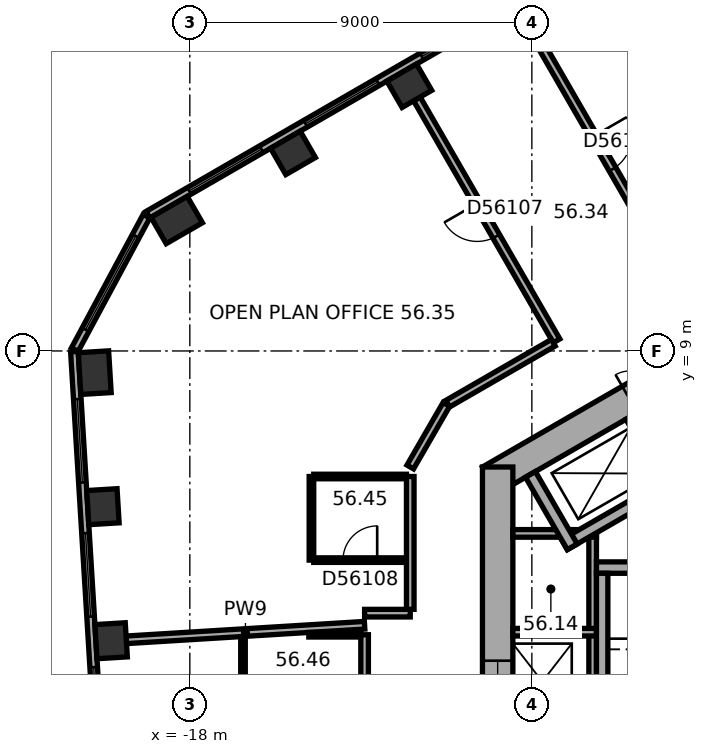
"""IFC4 building model, lengths in metres.
Left out: names, types, materials, properties, quantities, classifications, styles, units other than length and angle.
Written with IfcOpenShell. Run it as: python <this file> out.ifc"""

import sys

from ifc_helpers import new_model, si_unit, direction, frame, frame_2d, origin, origin_2d, place, context, subcontext, project, spatial, rectangle, extrude, element, fill, save


model = new_model("IFC4")
c1 = context("Model", 3, precision=1e-05, world=origin(), true_north=direction((0.0, 1.0)))
c2 = subcontext(c1, "Body", "Model", "MODEL_VIEW")
j1 = project(units=[si_unit("LENGTHUNIT", "METRE"), si_unit("PLANEANGLEUNIT", "RADIAN")], contexts=[c1])
p1 = place(None, origin())
s1 = spatial("IfcSite", under=j1, at=p1, CompositionType="ELEMENT")
p2 = place(p1, origin())
s2 = spatial("IfcBuilding", under=s1, at=p2, CompositionType="ELEMENT")
p3 = place(p2, frame((0.0, 0.0, 229.1)))
s3 = spatial("IfcBuildingStorey", under=s2, at=p3, CompositionType="ELEMENT", Elevation=229.1)
for number, where, z_axis, x_axis in (
    (1, (-12.225, 15.978, 0.0), (0.0, 0.0, 1.0), (-0.866, -0.5, 0.0)),
    (2, (-15.285, 14.211, 0.0), (0.0, 0.0, 1.0), (-0.866, -0.5, 0.0)),
):
    element("IfcColumn", number, at=place(p3, frame(where, z_axis=z_axis, x_axis=x_axis)), inside=s3, PredefinedType="COLUMN", context=c2, shape_type="SweptSolid", body=[
        extrude(rectangle(XDim=0.9, YDim=0.8, at=origin_2d()), origin(), (0.0, 0.0, 1.0), 3.7),
    ])
for number, where, z_axis, x_axis in (
    (3, (-18.345, 12.445, 0.0), (0.0, 0.0, 1.0), (-0.866, -0.5, 0.0)),
    (4, (-20.503, 8.429, 0.0), (0.0, 0.0, 1.0), (0.061, -0.998, 0.0)),
):
    element("IfcColumn", number, at=place(p3, frame(where, z_axis=z_axis, x_axis=x_axis)), inside=s3, PredefinedType="COLUMN", context=c2, shape_type="SweptSolid", body=[
        extrude(rectangle(XDim=1.1, YDim=0.8, at=origin_2d()), origin(), (0.0, 0.0, 1.0), 3.7),
    ])
for number, where, z_axis, x_axis in (
    (5, (-20.287, 4.902, 0.0), (0.0, 0.0, 1.0), (0.061, -0.998, 0.0)),
    (6, (-20.071, 1.375, 0.0), (0.0, 0.0, 1.0), (0.061, -0.998, 0.0)),
):
    element("IfcColumn", number, at=place(p3, frame(where, z_axis=z_axis, x_axis=x_axis)), inside=s3, PredefinedType="COLUMN", context=c2, shape_type="SweptSolid", body=[
        extrude(rectangle(XDim=0.9, YDim=0.8, at=origin_2d()), origin(), (0.0, 0.0, 1.0), 3.7),
    ])
p4 = place(p3, frame((0.2, 11.547, 0.0), z_axis=(0.0, 0.0, 1.0), x_axis=(-0.866023897231, -0.500002609418, 0.0)))
e7 = element("IfcWall", 7, at=p4, inside=s3, PredefinedType="SHEAR", context=c2, shape_type="SweptSolid", body=[
    extrude(rectangle(XDim=11.894, YDim=0.8, at=frame_2d((5.947, 0.0))), origin(), (0.0, 0.0, 1.0), 3.7),
])
p5 = place(p4, frame((6.147, 0.0, 0.0)))
e8 = element("IfcOpeningElement", 8, at=p5, cuts=e7, PredefinedType="OPENING", context=c2, shape_type="SweptSolid", body=[
    extrude(rectangle(XDim=1.5, YDim=2.1, at=frame_2d((0.75, 1.05))), frame((0.0, 0.41, 0.0), z_axis=(0.0, -1.0, 0.0), x_axis=(1.0, 0.0, 0.0)), (0.0, 0.0, 1.0), 0.82),
])
p6 = place(p4, frame((2.997, 0.0, 0.0)))
e9 = element("IfcOpeningElement", 9, at=p6, cuts=e7, PredefinedType="OPENING", context=c2, shape_type="SweptSolid", body=[
    extrude(rectangle(XDim=0.9, YDim=2.1, at=frame_2d((0.45, 1.05))), frame((0.0, 0.41, 0.0), z_axis=(0.0, -1.0, 0.0), x_axis=(1.0, 0.0, 0.0)), (0.0, 0.0, 1.0), 0.82),
])
p7 = place(p3, frame((-9.9, 5.947, 0.0), z_axis=(0.0, 0.0, 1.0), x_axis=(0.0, -1.0, 0.0)))
e10 = element("IfcWall", 10, at=p7, inside=s3, PredefinedType="SHEAR", context=c2, shape_type="SweptSolid", body=[
    extrude(rectangle(XDim=11.894, YDim=0.8, at=frame_2d((5.947, 0.0))), origin(), (0.0, 0.0, 1.0), 3.7),
])
p8 = place(p7, frame((5.097, 0.0, 0.0)))
e11 = element("IfcOpeningElement", 11, at=p8, cuts=e10, PredefinedType="OPENING", context=c2, shape_type="SweptSolid", body=[
    extrude(rectangle(XDim=1.1, YDim=2.1, at=frame_2d((0.55, 1.05))), frame((0.0, 0.41, 0.0), z_axis=(0.0, -1.0, 0.0), x_axis=(1.0, 0.0, 0.0)), (0.0, 0.0, 1.0), 0.82),
])
p9 = place(p7, frame((7.697, 0.0, 0.0)))
e12 = element("IfcOpeningElement", 12, at=p9, cuts=e10, PredefinedType="OPENING", context=c2, shape_type="SweptSolid", body=[
    extrude(rectangle(XDim=1.1, YDim=2.1, at=frame_2d((0.55, 1.05))), frame((0.0, 0.41, 0.0), z_axis=(0.0, -1.0, 0.0), x_axis=(1.0, 0.0, 0.0)), (0.0, 0.0, 1.0), 0.82),
])
p10 = place(p3, frame((-2.786, 22.005, 0.0), z_axis=(0.0, 0.0, 1.0), x_axis=(-0.866026555358, -0.49999800541, 0.0)))
e13 = element("IfcWall", 13, at=p10, inside=s3, PredefinedType="STANDARD", context=c2, shape_type="SweptSolid", body=[
    extrude(rectangle(XDim=18.841, YDim=0.2, at=frame_2d((9.421, 0.0))), origin(), (0.0, 0.0, 1.0), 3.7),
])
p11 = place(p10, frame((1.254, 0.0, 0.9)))
e14 = element("IfcOpeningElement", 14, at=p11, cuts=e13, PredefinedType="OPENING", context=c2, shape_type="SweptSolid", body=[
    extrude(rectangle(XDim=2.2, YDim=2.0, at=frame_2d((1.1, 1.0))), frame((0.0, 0.11, 0.0), z_axis=(0.0, -1.0, 0.0), x_axis=(1.0, 0.0, 0.0)), (0.0, 0.0, 1.0), 0.22),
])
p12 = place(p10, frame((4.788, 0.0, 0.9)))
e15 = element("IfcOpeningElement", 15, at=p12, cuts=e13, PredefinedType="OPENING", context=c2, shape_type="SweptSolid", body=[
    extrude(rectangle(XDim=2.2, YDim=2.0, at=frame_2d((1.1, 1.0))), frame((0.0, 0.11, 0.0), z_axis=(0.0, -1.0, 0.0), x_axis=(1.0, 0.0, 0.0)), (0.0, 0.0, 1.0), 0.22),
])
p13 = place(p10, frame((8.321, 0.0, 0.9)))
e16 = element("IfcOpeningElement", 16, at=p13, cuts=e13, PredefinedType="OPENING", context=c2, shape_type="SweptSolid", body=[
    extrude(rectangle(XDim=2.2, YDim=2.0, at=frame_2d((1.1, 1.0))), frame((0.0, 0.11, 0.0), z_axis=(0.0, -1.0, 0.0), x_axis=(1.0, 0.0, 0.0)), (0.0, 0.0, 1.0), 0.22),
])
p14 = place(p10, frame((11.855, 0.0, 0.9)))
e17 = element("IfcOpeningElement", 17, at=p14, cuts=e13, PredefinedType="OPENING", context=c2, shape_type="SweptSolid", body=[
    extrude(rectangle(XDim=2.2, YDim=2.0, at=frame_2d((1.1, 1.0))), frame((0.0, 0.11, 0.0), z_axis=(0.0, -1.0, 0.0), x_axis=(1.0, 0.0, 0.0)), (0.0, 0.0, 1.0), 0.22),
])
p15 = place(p10, frame((15.389, 0.0, 0.9)))
e18 = element("IfcOpeningElement", 18, at=p15, cuts=e13, PredefinedType="OPENING", context=c2, shape_type="SweptSolid", body=[
    extrude(rectangle(XDim=2.2, YDim=2.0, at=frame_2d((1.1, 1.0))), frame((0.0, 0.11, 0.0), z_axis=(0.0, -1.0, 0.0), x_axis=(1.0, 0.0, 0.0)), (0.0, 0.0, 1.0), 0.22),
])
p16 = place(p3, frame((-19.141, 12.545, 0.0), z_axis=(0.0, 0.0, 1.0), x_axis=(-0.473306370921, -0.880897882416, 0.0)))
e19 = element("IfcWall", 19, at=p16, inside=s3, PredefinedType="STANDARD", context=c2, shape_type="SweptSolid", body=[
    extrude(rectangle(XDim=3.983, YDim=0.2, at=frame_2d((1.991, 0.0))), origin(), (0.0, 0.0, 1.0), 3.7),
])
p17 = place(p16, frame((0.591, 0.0, 0.9)))
e20 = element("IfcOpeningElement", 20, at=p17, cuts=e19, PredefinedType="OPENING", context=c2, shape_type="SweptSolid", body=[
    extrude(rectangle(XDim=2.8, YDim=2.0, at=frame_2d((1.4, 1.0))), frame((0.0, 0.11, 0.0), z_axis=(0.0, -1.0, 0.0), x_axis=(1.0, 0.0, 0.0)), (0.0, 0.0, 1.0), 0.22),
])
p18 = place(p3, frame((-21.038, 8.984, 0.0), z_axis=(0.0, 0.0, 1.0), x_axis=(0.061043935634, -0.998135079998, 0.0)))
e21 = element("IfcWall", 21, at=p18, inside=s3, PredefinedType="STANDARD", context=c2, shape_type="SweptSolid", body=[
    extrude(rectangle(XDim=18.841, YDim=0.2, at=frame_2d((9.421, 0.0))), origin(), (0.0, 0.0, 1.0), 3.7),
])
p19 = place(p18, frame((1.253, 0.0, 0.9)))
e22 = element("IfcOpeningElement", 22, at=p19, cuts=e21, PredefinedType="OPENING", context=c2, shape_type="SweptSolid", body=[
    extrude(rectangle(XDim=2.2, YDim=2.0, at=frame_2d((1.1, 1.0))), frame((0.0, 0.11, 0.0), z_axis=(0.0, -1.0, 0.0), x_axis=(1.0, 0.0, 0.0)), (0.0, 0.0, 1.0), 0.22),
])
p20 = place(p18, frame((4.786, 0.0, 0.9)))
e23 = element("IfcOpeningElement", 23, at=p20, cuts=e21, PredefinedType="OPENING", context=c2, shape_type="SweptSolid", body=[
    extrude(rectangle(XDim=2.2, YDim=2.0, at=frame_2d((1.1, 1.0))), frame((0.0, 0.11, 0.0), z_axis=(0.0, -1.0, 0.0), x_axis=(1.0, 0.0, 0.0)), (0.0, 0.0, 1.0), 0.22),
])
p21 = place(p18, frame((8.32, 0.0, 0.9)))
e24 = element("IfcOpeningElement", 24, at=p21, cuts=e21, PredefinedType="OPENING", context=c2, shape_type="SweptSolid", body=[
    extrude(rectangle(XDim=2.2, YDim=2.0, at=frame_2d((1.1, 1.0))), frame((0.0, 0.11, 0.0), z_axis=(0.0, -1.0, 0.0), x_axis=(1.0, 0.0, 0.0)), (0.0, 0.0, 1.0), 0.22),
])
p22 = place(p18, frame((11.854, 0.0, 0.9)))
e25 = element("IfcOpeningElement", 25, at=p22, cuts=e21, PredefinedType="OPENING", context=c2, shape_type="SweptSolid", body=[
    extrude(rectangle(XDim=2.2, YDim=2.0, at=frame_2d((1.1, 1.0))), frame((0.0, 0.11, 0.0), z_axis=(0.0, -1.0, 0.0), x_axis=(1.0, 0.0, 0.0)), (0.0, 0.0, 1.0), 0.22),
])
p23 = place(p18, frame((15.387, 0.0, 0.9)))
e26 = element("IfcOpeningElement", 26, at=p23, cuts=e21, PredefinedType="OPENING", context=c2, shape_type="SweptSolid", body=[
    extrude(rectangle(XDim=2.2, YDim=2.0, at=frame_2d((1.1, 1.0))), frame((0.0, 0.11, 0.0), z_axis=(0.0, -1.0, 0.0), x_axis=(1.0, 0.0, 0.0)), (0.0, 0.0, 1.0), 0.22),
])
p24 = place(p3, frame((-7.4, 4.3, 0.0), z_axis=(0.0, 0.0, 1.0), x_axis=(0.0, -1.0, 0.0)))
e27 = element("IfcWall", 27, at=p24, inside=s3, PredefinedType="PARTITIONING", context=c2, shape_type="SweptSolid", body=[
    extrude(rectangle(XDim=8.0, YDim=0.2, at=frame_2d((4.0, 0.0))), origin(), (0.0, 0.0, 1.0), 3.42),
])
for number, where, z_axis, x_axis in (
    (28, (-7.3, 4.2, 0.0), (0.0, 0.0, 1.0), (-1.0, 0.0, 0.0)),
    (29, (-7.3, 1.6, 0.0), (0.0, 0.0, 1.0), (-1.0, 0.0, 0.0)),
):
    element("IfcWall", number, at=place(p3, frame(where, z_axis=z_axis, x_axis=x_axis)), inside=s3, PredefinedType="PARTITIONING", context=c2, shape_type="SweptSolid", body=[
        extrude(rectangle(XDim=2.2, YDim=0.2, at=frame_2d((1.1, 0.0))), origin(), (0.0, 0.0, 1.0), 3.42),
    ])
p25 = place(p3, frame((-2.6, 3.3, 0.0), z_axis=(0.0, 0.0, 1.0), x_axis=(-1.0, 0.0, 0.0)))
e30 = element("IfcWall", 30, at=p25, inside=s3, PredefinedType="SHEAR", context=c2, shape_type="SweptSolid", body=[
    extrude(rectangle(XDim=4.7, YDim=0.3, at=frame_2d((2.35, 0.0))), origin(), (0.0, 0.0, 1.0), 3.42),
])
p26 = place(p25, frame((0.8, 0.0, 0.0)))
e31 = element("IfcOpeningElement", 31, at=p26, cuts=e30, PredefinedType="OPENING", context=c2, shape_type="SweptSolid", body=[
    extrude(rectangle(XDim=1.2, YDim=2.1, at=frame_2d((0.6, 1.05))), frame((0.0, 0.16, 0.0), z_axis=(0.0, -1.0, 0.0), x_axis=(1.0, 0.0, 0.0)), (0.0, 0.0, 1.0), 0.32),
])
p27 = place(p3, frame((-7.15, 3.15, 0.0), z_axis=(0.0, 0.0, 1.0), x_axis=(0.0, -1.0, 0.0)))
e32 = element("IfcWall", 32, at=p27, inside=s3, PredefinedType="SHEAR", context=c2, shape_type="SweptSolid", body=[
    extrude(rectangle(XDim=7.06, YDim=0.3, at=frame_2d((3.53, 0.0))), origin(), (0.0, 0.0, 1.0), 3.42),
])
p28 = place(p3, frame((-5.295, 5.372, 0.0), z_axis=(0.0, 0.0, 1.0), x_axis=(-0.500077893725, 0.86598042715, 0.0)))
e33 = element("IfcWall", 33, at=p28, inside=s3, PredefinedType="SHEAR", context=c2, shape_type="SweptSolid", body=[
    extrude(rectangle(XDim=2.2, YDim=0.3, at=frame_2d((1.1, 0.0))), origin(), (0.0, 0.0, 1.0), 3.42),
])
p29 = place(p28, frame((0.7, 0.0, 0.0)))
e34 = element("IfcOpeningElement", 34, at=p29, cuts=e33, PredefinedType="OPENING", context=c2, shape_type="SweptSolid", body=[
    extrude(rectangle(XDim=1.1, YDim=2.1, at=frame_2d((0.55, 1.05))), frame((0.0, 0.16, 0.0), z_axis=(0.0, -1.0, 0.0), x_axis=(1.0, 0.0, 0.0)), (0.0, 0.0, 1.0), 0.32),
])
p30 = place(p3, frame((-5.24, 5.577, 0.0), z_axis=(0.0, 0.0, 1.0), x_axis=(-0.866014461049, -0.500018952895, 0.0)))
e35 = element("IfcWall", 35, at=p30, inside=s3, PredefinedType="SHEAR", context=c2, shape_type="SweptSolid", body=[
    extrude(rectangle(XDim=3.35, YDim=0.3, at=frame_2d((1.675, 0.0))), origin(), (0.0, 0.0, 1.0), 3.42),
])
p31 = place(p3, frame((-7.937, 3.847, 0.0), z_axis=(0.0, 0.0, 1.0), x_axis=(-0.50002983664, 0.866008176907, 0.0)))
e36 = element("IfcWall", 36, at=p31, inside=s3, PredefinedType="SHEAR", context=c2, shape_type="SweptSolid", body=[
    extrude(rectangle(XDim=2.2, YDim=0.3, at=frame_2d((1.1, 0.0))), origin(), (0.0, 0.0, 1.0), 3.42),
])
p32 = place(p3, frame((-19.672, 1.4, 0.0), z_axis=(0.0, 0.0, 1.0), x_axis=(0.99813499784, 0.061045278997, 0.0)))
e37 = element("IfcWall", 37, at=p32, inside=s3, PredefinedType="PARTITIONING", context=c2, shape_type="SweptSolid", body=[
    extrude(rectangle(XDim=6.283, YDim=0.2, at=frame_2d((3.142, 0.0))), origin(), (0.0, 0.0, 1.0), 2.87),
])
p33 = place(p3, frame((-16.601, -1.267, 0.0), z_axis=(0.0, 0.0, 1.0), x_axis=(0.0, 1.0, 0.0)))
e38 = element("IfcWall", 38, at=p33, inside=s3, PredefinedType="PARTITIONING", context=c2, shape_type="SweptSolid", body=[
    extrude(rectangle(XDim=2.75, YDim=0.12, at=frame_2d((1.375, 0.0))), origin(), (0.0, 0.0, 1.0), 3.42),
])
p34 = place(p3, frame((-14.869, 1.533, 0.0), z_axis=(0.0, 0.0, 1.0), x_axis=(1.0, 0.0, 0.0)))
e39 = element("IfcWall", 39, at=p34, inside=s3, PredefinedType="PARTITIONING", context=c2, shape_type="SweptSolid", body=[
    extrude(rectangle(XDim=1.368, YDim=0.12, at=frame_2d((0.684, 0.0))), origin(), (0.0, 0.0, 1.0), 3.42),
])
p35 = place(p3, frame((-14.8, 3.497, 0.0), z_axis=(0.0, 0.0, 1.0), x_axis=(0.0, 1.0, 0.0)))
e40 = element("IfcWall", 40, at=p35, inside=s3, PredefinedType="PARTITIONING", context=c2, shape_type="SweptSolid", body=[
    extrude(rectangle(XDim=2.2, YDim=0.12, at=frame_2d((1.1, 0.0))), origin(), (0.0, 0.0, 1.0), 3.42),
])
p36 = place(p3, frame((-14.74, 5.697, 0.0), z_axis=(0.0, 0.0, 1.0), x_axis=(1.0, 0.0, 0.0)))
e41 = element("IfcWall", 41, at=p36, inside=s3, PredefinedType="PARTITIONING", context=c2, shape_type="SweptSolid", body=[
    extrude(rectangle(XDim=2.44, YDim=0.12, at=frame_2d((1.22, 0.0))), origin(), (0.0, 0.0, 1.0), 3.42),
])
p37 = place(p3, frame((-13.401, 1.533, 0.0), z_axis=(0.0, 0.0, 1.0), x_axis=(0.0, -1.0, 0.0)))
e42 = element("IfcWall", 42, at=p37, inside=s3, PredefinedType="PARTITIONING", context=c2, shape_type="SweptSolid", body=[
    extrude(rectangle(XDim=5.534, YDim=0.2, at=frame_2d((2.767, 0.0))), origin(), (0.0, 0.0, 1.0), 3.42),
])
p38 = place(p37, frame((3.692, 0.0, 0.0)))
e43 = element("IfcOpeningElement", 43, at=p38, cuts=e42, PredefinedType="OPENING", context=c2, shape_type="SweptSolid", body=[
    extrude(rectangle(XDim=1.0, YDim=2.1, at=frame_2d((0.5, 1.05))), frame((0.0, 0.11, 0.0), z_axis=(0.0, -1.0, 0.0), x_axis=(1.0, 0.0, 0.0)), (0.0, 0.0, 1.0), 0.22),
])
p39 = place(p3, frame((-12.3, 3.497, 0.0), z_axis=(0.0, 0.0, 1.0), x_axis=(-1.0, 0.0, 0.0)))
e44 = element("IfcWall", 44, at=p39, inside=s3, PredefinedType="PARTITIONING", context=c2, shape_type="SweptSolid", body=[
    extrude(rectangle(XDim=2.44, YDim=0.12, at=frame_2d((1.22, 0.0))), origin(), (0.0, 0.0, 1.0), 3.42),
])
p40 = place(p39, frame((0.77, 0.0, 0.0)))
e45 = element("IfcOpeningElement", 45, at=p40, cuts=e44, PredefinedType="OPENING", context=c2, shape_type="SweptSolid", body=[
    extrude(rectangle(XDim=0.9, YDim=2.1, at=frame_2d((0.45, 1.05))), frame((0.0, 0.07, 0.0), z_axis=(0.0, -1.0, 0.0), x_axis=(1.0, 0.0, 0.0)), (0.0, 0.0, 1.0), 0.14),
])
p41 = place(p3, frame((-12.2, 2.101, 0.0), z_axis=(0.0, 0.0, 1.0), x_axis=(-1.0, 0.0, 0.0)))
e46 = element("IfcWall", 46, at=p41, inside=s3, PredefinedType="PARTITIONING", context=c2, shape_type="SweptSolid", body=[
    extrude(rectangle(XDim=1.201, YDim=0.2, at=frame_2d((0.601, 0.0))), origin(), (0.0, 0.0, 1.0), 3.42),
])
p42 = place(p3, frame((-12.2, 5.697, 0.0), z_axis=(0.0, 0.0, 1.0), x_axis=(0.0, -1.0, 0.0)))
e47 = element("IfcWall", 47, at=p42, inside=s3, PredefinedType="PARTITIONING", context=c2, shape_type="SweptSolid", body=[
    extrude(rectangle(XDim=3.496, YDim=0.2, at=frame_2d((1.748, 0.0))), origin(), (0.0, 0.0, 1.0), 3.42),
])
p43 = place(p3, frame((-12.025, 15.632, 0.0), z_axis=(0.0, 0.0, 1.0), x_axis=(0.499983153418, -0.866035129944, 0.0)))
e48 = element("IfcWall", 48, at=p43, inside=s3, PredefinedType="PARTITIONING", context=c2, shape_type="SweptSolid", body=[
    extrude(rectangle(XDim=7.35, YDim=0.2, at=frame_2d((3.675, 0.0))), origin(), (0.0, 0.0, 1.0), 3.42),
])
p44 = place(p43, frame((3.175, 0.0, 0.0)))
e49 = element("IfcOpeningElement", 49, at=p44, cuts=e48, PredefinedType="OPENING", context=c2, shape_type="SweptSolid", body=[
    extrude(rectangle(XDim=1.0, YDim=2.1, at=frame_2d((0.5, 1.05))), frame((0.0, 0.11, 0.0), z_axis=(0.0, -1.0, 0.0), x_axis=(1.0, 0.0, 0.0)), (0.0, 0.0, 1.0), 0.22),
])
p45 = place(p3, frame((-11.25, 7.592, 0.0), z_axis=(0.0, 0.0, 1.0), x_axis=(-0.500022797313, -0.86601224135, 0.0)))
e50 = element("IfcWall", 50, at=p45, inside=s3, PredefinedType="PARTITIONING", context=c2, shape_type="SweptSolid", body=[
    extrude(rectangle(XDim=1.9, YDim=0.2, at=frame_2d((0.95, 0.0))), origin(), (0.0, 0.0, 1.0), 3.42),
])
p46 = place(p3, frame((-8.965, 17.399, 0.0), z_axis=(0.0, 0.0, 1.0), x_axis=(0.499993683172, -0.866029050776, 0.0)))
e51 = element("IfcWall", 51, at=p46, inside=s3, PredefinedType="PARTITIONING", context=c2, shape_type="SweptSolid", body=[
    extrude(rectangle(XDim=7.35, YDim=0.2, at=frame_2d((3.675, 0.0))), origin(), (0.0, 0.0, 1.0), 2.87),
])
p47 = place(p46, frame((3.175, 0.0, 0.0)))
e52 = element("IfcOpeningElement", 52, at=p47, cuts=e51, PredefinedType="OPENING", context=c2, shape_type="SweptSolid", body=[
    extrude(rectangle(XDim=1.0, YDim=2.1, at=frame_2d((0.5, 1.05))), frame((0.0, 0.11, 0.0), z_axis=(0.0, -1.0, 0.0), x_axis=(1.0, 0.0, 0.0)), (0.0, 0.0, 1.0), 0.22),
])
p48 = place(p3, frame((-8.437, 9.217, 0.0), z_axis=(0.0, 0.0, 1.0), x_axis=(-0.866005660673, -0.500034194513, 0.0)))
e53 = element("IfcWall", 53, at=p48, inside=s3, PredefinedType="PARTITIONING", context=c2, shape_type="SweptSolid", body=[
    extrude(rectangle(XDim=3.209, YDim=0.2, at=frame_2d((1.604, 0.0))), origin(), (0.0, 0.0, 1.0), 3.42),
])
p49 = place(p13, origin())
e54 = element("IfcWindow", 54, at=p49, inside=s3, PartitioningType="SINGLE_PANEL", PredefinedType="WINDOW", context=c2, shape_type="SweptSolid", body=[
    extrude(rectangle(XDim=2.2, YDim=2.0, at=frame_2d((1.1, 1.0))), frame((0.0, 0.03, 0.0), z_axis=(0.0, -1.0, 0.0), x_axis=(1.0, 0.0, 0.0)), (0.0, 0.0, 1.0), 0.06),
])
fill(e16, e54)
p50 = place(p14, origin())
e55 = element("IfcWindow", 55, at=p50, inside=s3, PartitioningType="SINGLE_PANEL", PredefinedType="WINDOW", context=c2, shape_type="SweptSolid", body=[
    extrude(rectangle(XDim=2.2, YDim=2.0, at=frame_2d((1.1, 1.0))), frame((0.0, 0.03, 0.0), z_axis=(0.0, -1.0, 0.0), x_axis=(1.0, 0.0, 0.0)), (0.0, 0.0, 1.0), 0.06),
])
fill(e17, e55)
p51 = place(p15, origin())
e56 = element("IfcWindow", 56, at=p51, inside=s3, PartitioningType="SINGLE_PANEL", PredefinedType="WINDOW", context=c2, shape_type="SweptSolid", body=[
    extrude(rectangle(XDim=2.2, YDim=2.0, at=frame_2d((1.1, 1.0))), frame((0.0, 0.03, 0.0), z_axis=(0.0, -1.0, 0.0), x_axis=(1.0, 0.0, 0.0)), (0.0, 0.0, 1.0), 0.06),
])
fill(e18, e56)
p52 = place(p17, origin())
e57 = element("IfcWindow", 57, at=p52, inside=s3, PartitioningType="SINGLE_PANEL", PredefinedType="WINDOW", context=c2, shape_type="SweptSolid", body=[
    extrude(rectangle(XDim=2.8, YDim=2.0, at=frame_2d((1.4, 1.0))), frame((0.0, 0.03, 0.0), z_axis=(0.0, -1.0, 0.0), x_axis=(1.0, 0.0, 0.0)), (0.0, 0.0, 1.0), 0.06),
])
fill(e20, e57)
p53 = place(p19, origin())
e58 = element("IfcWindow", 58, at=p53, inside=s3, PartitioningType="SINGLE_PANEL", PredefinedType="WINDOW", context=c2, shape_type="SweptSolid", body=[
    extrude(rectangle(XDim=2.2, YDim=2.0, at=frame_2d((1.1, 1.0))), frame((0.0, 0.03, 0.0), z_axis=(0.0, -1.0, 0.0), x_axis=(1.0, 0.0, 0.0)), (0.0, 0.0, 1.0), 0.06),
])
fill(e22, e58)
p54 = place(p20, origin())
e59 = element("IfcWindow", 59, at=p54, inside=s3, PartitioningType="SINGLE_PANEL", PredefinedType="WINDOW", context=c2, shape_type="SweptSolid", body=[
    extrude(rectangle(XDim=2.2, YDim=2.0, at=frame_2d((1.1, 1.0))), frame((0.0, 0.03, 0.0), z_axis=(0.0, -1.0, 0.0), x_axis=(1.0, 0.0, 0.0)), (0.0, 0.0, 1.0), 0.06),
])
fill(e23, e59)
p55 = place(p21, origin())
e60 = element("IfcWindow", 60, at=p55, inside=s3, PartitioningType="SINGLE_PANEL", PredefinedType="WINDOW", context=c2, shape_type="SweptSolid", body=[
    extrude(rectangle(XDim=2.2, YDim=2.0, at=frame_2d((1.1, 1.0))), frame((0.0, 0.03, 0.0), z_axis=(0.0, -1.0, 0.0), x_axis=(1.0, 0.0, 0.0)), (0.0, 0.0, 1.0), 0.06),
])
fill(e24, e60)
p56 = place(p8, origin())
e61 = element("IfcDoor", 61, at=p56, inside=s3, OperationType="DOUBLE_DOOR_SLIDING", PredefinedType="DOOR", context=c2, shape_type="SweptSolid", body=[
    extrude(rectangle(XDim=1.1, YDim=2.1, at=frame_2d((0.55, 1.05))), frame((0.0, 0.025, 0.0), z_axis=(0.0, -1.0, 0.0), x_axis=(1.0, 0.0, 0.0)), (0.0, 0.0, 1.0), 0.05),
])
fill(e11, e61)
p57 = place(p47, origin())
e62 = element("IfcDoor", 62, at=p57, inside=s3, OperationType="SINGLE_SWING_LEFT", PredefinedType="DOOR", context=c2, shape_type="SweptSolid", body=[
    extrude(rectangle(XDim=1.0, YDim=2.1, at=frame_2d((0.5, 1.05))), frame((0.0, 0.025, 0.0), z_axis=(0.0, -1.0, 0.0), x_axis=(1.0, 0.0, 0.0)), (0.0, 0.0, 1.0), 0.05),
])
fill(e52, e62)
p58 = place(p44, origin())
e63 = element("IfcDoor", 63, at=p58, inside=s3, OperationType="SINGLE_SWING_LEFT", PredefinedType="DOOR", context=c2, shape_type="SweptSolid", body=[
    extrude(rectangle(XDim=1.0, YDim=2.1, at=frame_2d((0.5, 1.05))), frame((0.0, 0.025, 0.0), z_axis=(0.0, -1.0, 0.0), x_axis=(1.0, 0.0, 0.0)), (0.0, 0.0, 1.0), 0.05),
])
fill(e49, e63)
p59 = place(p40, origin())
e64 = element("IfcDoor", 64, at=p59, inside=s3, OperationType="SINGLE_SWING_LEFT", PredefinedType="DOOR", context=c2, shape_type="SweptSolid", body=[
    extrude(rectangle(XDim=0.9, YDim=2.1, at=frame_2d((0.45, 1.05))), frame((0.0, 0.025, 0.0), z_axis=(0.0, -1.0, 0.0), x_axis=(1.0, 0.0, 0.0)), (0.0, 0.0, 1.0), 0.05),
])
fill(e45, e64)
save(model, sys.argv[1])
